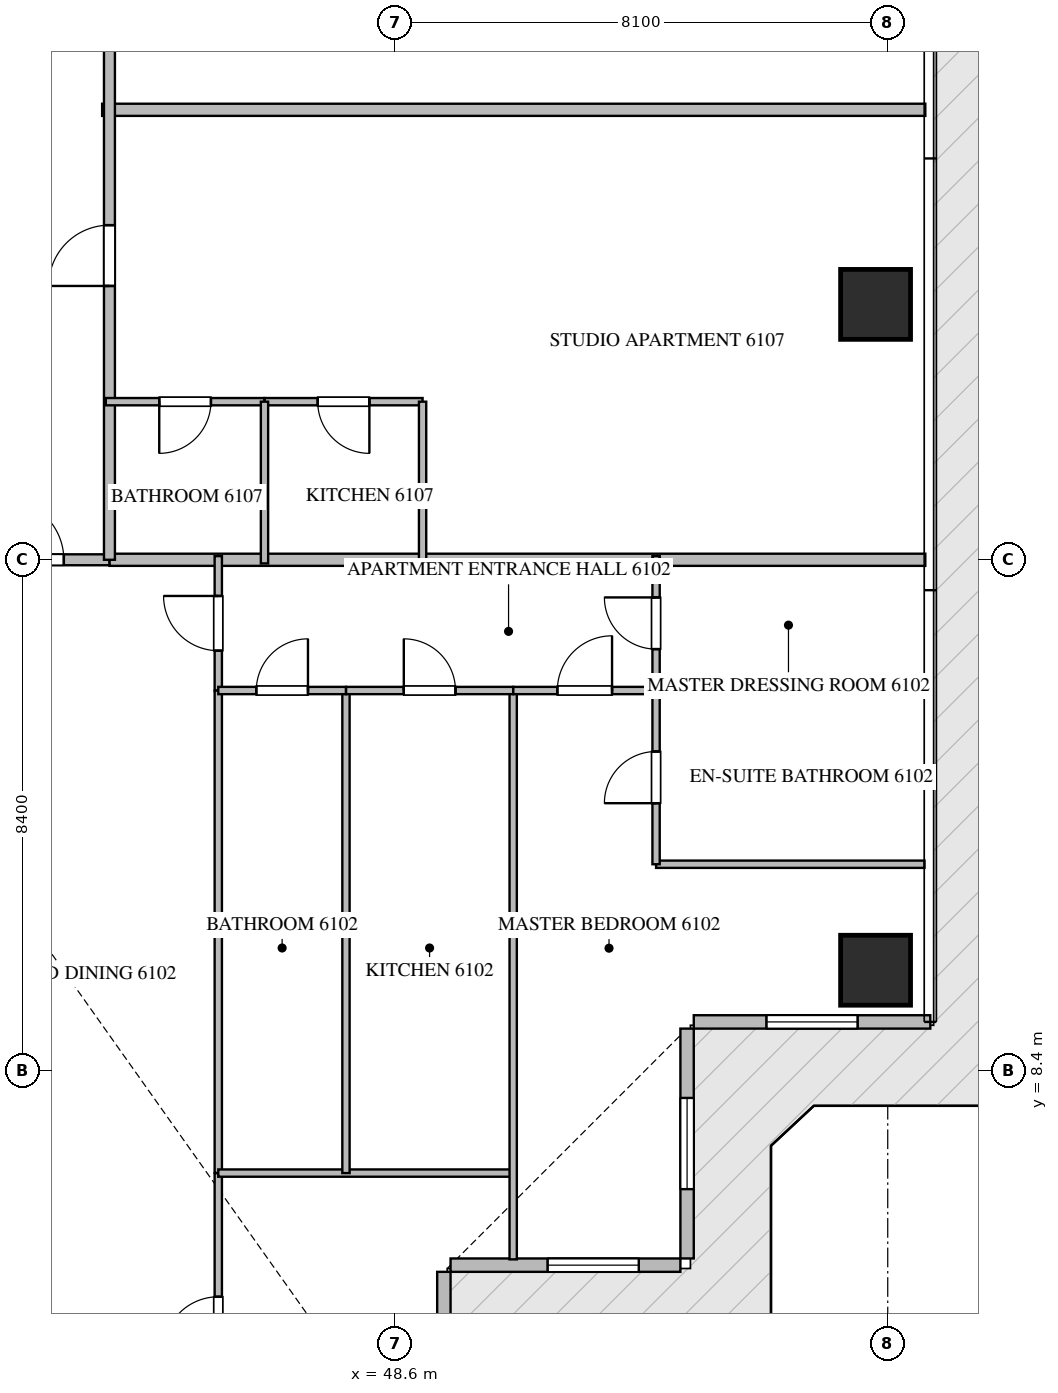
"""IFC4 building model, lengths in metres.
Left out: names, types, materials, properties, quantities, classifications, styles, units other than length and angle.
Written with IfcOpenShell. Run it as: python <this file> out.ifc"""

import sys

from ifc_helpers import new_model, si_unit, direction, frame, frame_2d, origin, origin_2d, place, context, subcontext, project, spatial, rectangle, extrude, source, transform, mapped, element, fill, save


model = new_model("IFC4")
c1 = context("Model", 3, precision=1e-05, world=origin(), true_north=direction((0.0, 1.0)))
c2 = subcontext(c1, "Body", "Model", "MODEL_VIEW")
j1 = project(units=[si_unit("LENGTHUNIT", "METRE"), si_unit("PLANEANGLEUNIT", "RADIAN")], contexts=[c1])
p1 = place(None, origin())
s1 = spatial("IfcSite", under=j1, at=p1, CompositionType="ELEMENT")
p2 = place(p1, origin())
s2 = spatial("IfcBuilding", under=s1, at=p2, CompositionType="ELEMENT")
p3 = place(p2, frame((0.0, 0.0, 245.1)))
s3 = spatial("IfcBuildingStorey", under=s2, at=p3, CompositionType="ELEMENT", Elevation=245.1)
m1 = source(origin(), c2, "Body", "SweptSolid", [
    extrude(rectangle(XDim=1.15, YDim=1.15, at=origin_2d()), origin(), (0.0, 0.0, 1.0), 3.85),
])
for number, where, z_axis, x_axis in (
    (1, (56.5, 10.05, -0.26), (0.0, 0.0, 1.0), (1.0, 0.0, 0.0)),
    (2, (56.5, 21.0, -0.26), (0.0, 0.0, 1.0), (1.0, 0.0, 0.0)),
):
    element("IfcColumn", number, at=place(p3, frame(where, z_axis=z_axis, x_axis=x_axis)), inside=s3, PredefinedType="COLUMN", context=c2, shape_type="MappedRepresentation", body=[
        mapped(m1, transform((0.0, 0.0, 0.0), scale=1.0)),
    ])
p4 = place(p3, frame((49.4, 1.2, 0.0), z_axis=(0.0, 0.0, 1.0), x_axis=(0.0, 1.0, 0.0)))
e3 = element("IfcWall", 3, at=p4, inside=s3, PredefinedType="ELEMENTEDWALL", context=c2, shape_type="SweptSolid", body=[
    extrude(rectangle(XDim=3.89, YDim=0.22, at=frame_2d((1.945, 0.0))), origin(), (0.0, 0.0, 1.0), 3.575),
])
p5 = place(p4, frame((1.195, 0.0, 0.65)))
e4 = element("IfcOpeningElement", 4, at=p5, cuts=e3, PredefinedType="OPENING", context=c2, shape_type="SweptSolid", body=[
    extrude(rectangle(XDim=1.5, YDim=2.25, at=frame_2d((0.75, 1.125))), frame((0.0, 0.12, 0.0), z_axis=(0.0, -1.0, 0.0), x_axis=(1.0, 0.0, 0.0)), (0.0, 0.0, 1.0), 0.24),
])
p6 = place(p3, frame((49.51, 5.2, 0.0), z_axis=(0.0, 0.0, 1.0), x_axis=(1.0, 0.0, 0.0)))
e5 = element("IfcWall", 5, at=p6, inside=s3, PredefinedType="ELEMENTEDWALL", context=c2, shape_type="SweptSolid", body=[
    extrude(rectangle(XDim=3.78, YDim=0.22, at=frame_2d((1.89, 0.0))), origin(), (0.0, 0.0, 1.0), 3.575),
])
p7 = place(p6, frame((1.596, 0.0, 0.65)))
e6 = element("IfcOpeningElement", 6, at=p7, cuts=e5, PredefinedType="OPENING", context=c2, shape_type="SweptSolid", body=[
    extrude(rectangle(XDim=1.5, YDim=2.25, at=frame_2d((0.75, 1.125))), frame((0.0, 0.12, 0.0), z_axis=(0.0, -1.0, 0.0), x_axis=(1.0, 0.0, 0.0)), (0.0, 0.0, 1.0), 0.24),
])
p8 = place(p3, frame((53.4, 5.31, 0.0), z_axis=(0.0, 0.0, 1.0), x_axis=(0.0, 1.0, 0.0)))
e7 = element("IfcWall", 7, at=p8, inside=s3, PredefinedType="ELEMENTEDWALL", context=c2, shape_type="SweptSolid", body=[
    extrude(rectangle(XDim=3.78, YDim=0.22, at=frame_2d((1.89, 0.0))), origin(), (0.0, 0.0, 1.0), 3.575),
])
p9 = place(p8, frame((1.14, 0.0, 0.65)))
e8 = element("IfcOpeningElement", 8, at=p9, cuts=e7, PredefinedType="OPENING", context=c2, shape_type="SweptSolid", body=[
    extrude(rectangle(XDim=1.5, YDim=2.25, at=frame_2d((0.75, 1.125))), frame((0.0, 0.12, 0.0), z_axis=(0.0, -1.0, 0.0), x_axis=(1.0, 0.0, 0.0)), (0.0, 0.0, 1.0), 0.24),
])
p10 = place(p3, frame((53.51, 9.2, 0.0), z_axis=(0.0, 0.0, 1.0), x_axis=(1.0, 0.0, 0.0)))
e9 = element("IfcWall", 9, at=p10, inside=s3, PredefinedType="ELEMENTEDWALL", context=c2, shape_type="SweptSolid", body=[
    extrude(rectangle(XDim=3.89, YDim=0.22, at=frame_2d((1.945, 0.0))), origin(), (0.0, 0.0, 1.0), 3.575),
])
p11 = place(p10, frame((1.195, 0.0, 0.65)))
e10 = element("IfcOpeningElement", 10, at=p11, cuts=e9, PredefinedType="OPENING", context=c2, shape_type="SweptSolid", body=[
    extrude(rectangle(XDim=1.5, YDim=2.25, at=frame_2d((0.75, 1.125))), frame((0.0, 0.12, 0.0), z_axis=(0.0, -1.0, 0.0), x_axis=(1.0, 0.0, 0.0)), (0.0, 0.0, 1.0), 0.24),
])
p12 = place(p3, frame((43.78, 24.2, 0.0), z_axis=(0.0, 0.0, 1.0), x_axis=(1.0, 0.0, 0.0)))
e11 = element("IfcWall", 11, at=p12, inside=s3, PredefinedType="PARTITIONING", context=c2, shape_type="SweptSolid", body=[
    extrude(rectangle(XDim=13.538, YDim=0.2, at=frame_2d((6.769, 0.0))), origin(), (0.0, 0.0, 1.0), 3.59),
])
p13 = place(p3, frame((43.9, 16.8, 0.0), z_axis=(0.0, 0.0, 1.0), x_axis=(1.0, 0.0, 0.0)))
e12 = element("IfcWall", 12, at=p13, inside=s3, PredefinedType="PARTITIONING", context=c2, shape_type="SweptSolid", body=[
    extrude(rectangle(XDim=13.418, YDim=0.2, at=frame_2d((6.709, 0.0))), origin(), (0.0, 0.0, 1.0), 3.59),
])
p14 = place(p3, frame((41.402, 16.8, 0.0), z_axis=(0.0, 0.0, 1.0), x_axis=(1.0, 0.0, 0.0)))
e13 = element("IfcWall", 13, at=p14, inside=s3, PredefinedType="PARTITIONING", context=c2, shape_type="SweptSolid", body=[
    extrude(rectangle(XDim=2.496, YDim=0.18, at=frame_2d((1.248, 0.0))), origin(), (0.0, 0.0, 1.0), 3.59),
])
p15 = place(p14, frame((0.748, 0.0, 0.0)))
e14 = element("IfcOpeningElement", 14, at=p15, cuts=e13, PredefinedType="OPENING", context=c2, shape_type="SweptSolid", body=[
    extrude(rectangle(XDim=1.0, YDim=2.15, at=frame_2d((0.5, 1.075))), frame((0.0, 0.1, 0.0), z_axis=(0.0, -1.0, 0.0), x_axis=(1.0, 0.0, 0.0)), (0.0, 0.0, 1.0), 0.2),
])
p16 = place(p3, frame((43.9, 16.8, 0.0), z_axis=(0.0, 0.0, 1.0), x_axis=(0.0, 1.0, 0.0)))
e15 = element("IfcWall", 15, at=p16, inside=s3, PredefinedType="PARTITIONING", context=c2, shape_type="SweptSolid", body=[
    extrude(rectangle(XDim=16.8, YDim=0.18, at=frame_2d((8.4, 0.0))), origin(), (0.0, 0.0, 1.0), 3.59),
])
p17 = place(p16, frame((4.503, 0.0, 0.0)))
e16 = element("IfcOpeningElement", 16, at=p17, cuts=e15, PredefinedType="OPENING", context=c2, shape_type="SweptSolid", body=[
    extrude(rectangle(XDim=1.0, YDim=2.15, at=frame_2d((0.5, 1.075))), frame((0.0, 0.1, 0.0), z_axis=(0.0, -1.0, 0.0), x_axis=(1.0, 0.0, 0.0)), (0.0, 0.0, 1.0), 0.2),
])
p18 = place(p16, frame((8.706, 0.0, 0.0)))
e17 = element("IfcOpeningElement", 17, at=p18, cuts=e15, PredefinedType="OPENING", context=c2, shape_type="SweptSolid", body=[
    extrude(rectangle(XDim=1.0, YDim=2.15, at=frame_2d((0.5, 1.075))), frame((0.0, 0.1, 0.0), z_axis=(0.0, -1.0, 0.0), x_axis=(1.0, 0.0, 0.0)), (0.0, 0.0, 1.0), 0.2),
])
p19 = place(p3, frame((45.69, 14.65, 0.0), z_axis=(0.0, 0.0, 1.0), x_axis=(0.0, 1.0, 0.0)))
e18 = element("IfcWall", 18, at=p19, inside=s3, PredefinedType="PARTITIONING", context=c2, shape_type="SweptSolid", body=[
    extrude(rectangle(XDim=2.21, YDim=0.12, at=frame_2d((1.105, 0.0))), origin(), (0.0, 0.0, 1.0), 3.59),
])
p20 = place(p19, frame((0.655, 0.0, 0.0)))
e19 = element("IfcOpeningElement", 19, at=p20, cuts=e18, PredefinedType="OPENING", context=c2, shape_type="SweptSolid", body=[
    extrude(rectangle(XDim=0.9, YDim=2.1, at=frame_2d((0.45, 1.05))), frame((0.0, 0.07, 0.0), z_axis=(0.0, -1.0, 0.0), x_axis=(1.0, 0.0, 0.0)), (0.0, 0.0, 1.0), 0.14),
])
p21 = place(p3, frame((45.69, 1.295, 0.0), z_axis=(0.0, 0.0, 1.0), x_axis=(0.0, 1.0, 0.0)))
e20 = element("IfcWall", 20, at=p21, inside=s3, PredefinedType="PARTITIONING", context=c2, shape_type="SweptSolid", body=[
    extrude(rectangle(XDim=5.419, YDim=0.12, at=frame_2d((2.709, 0.0))), origin(), (0.0, 0.0, 1.0), 3.59),
])
p22 = place(p21, frame((2.485, 0.0, 0.0)))
e21 = element("IfcOpeningElement", 21, at=p22, cuts=e20, PredefinedType="OPENING", context=c2, shape_type="SweptSolid", body=[
    extrude(rectangle(XDim=0.9, YDim=2.1, at=frame_2d((0.45, 1.05))), frame((0.0, 0.07, 0.0), z_axis=(0.0, -1.0, 0.0), x_axis=(1.0, 0.0, 0.0)), (0.0, 0.0, 1.0), 0.14),
])
p23 = place(p3, frame((45.69, 6.716, 0.0), z_axis=(0.0, 0.0, 1.0), x_axis=(0.0, 1.0, 0.0)))
e22 = element("IfcWall", 22, at=p23, inside=s3, PredefinedType="PARTITIONING", context=c2, shape_type="SweptSolid", body=[
    extrude(rectangle(XDim=7.932, YDim=0.12, at=frame_2d((3.966, 0.0))), origin(), (0.0, 0.0, 1.0), 3.59),
])
p24 = place(p3, frame((45.69, 6.714, 0.0), z_axis=(0.0, 0.0, 1.0), x_axis=(1.0, 0.0, 0.0)))
e23 = element("IfcWall", 23, at=p24, inside=s3, PredefinedType="PARTITIONING", context=c2, shape_type="SweptSolid", body=[
    extrude(rectangle(XDim=4.85, YDim=0.12, at=frame_2d((2.425, 0.0))), origin(), (0.0, 0.0, 1.0), 3.59),
])
p25 = place(p3, frame((50.54, 5.295, 0.0), z_axis=(0.0, 0.0, 1.0), x_axis=(0.0, 1.0, 0.0)))
e24 = element("IfcWall", 24, at=p25, inside=s3, PredefinedType="PARTITIONING", context=c2, shape_type="SweptSolid", body=[
    extrude(rectangle(XDim=9.355, YDim=0.12, at=frame_2d((4.677, 0.0))), origin(), (0.0, 0.0, 1.0), 3.59),
])
p26 = place(p3, frame((47.79, 6.714, 0.0), z_axis=(0.0, 0.0, 1.0), x_axis=(0.0, 1.0, 0.0)))
e25 = element("IfcWall", 25, at=p26, inside=s3, PredefinedType="PARTITIONING", context=c2, shape_type="SweptSolid", body=[
    extrude(rectangle(XDim=7.936, YDim=0.12, at=frame_2d((3.968, 0.0))), origin(), (0.0, 0.0, 1.0), 3.59),
])
p27 = place(p3, frame((45.69, 14.65, 0.0), z_axis=(0.0, 0.0, 1.0), x_axis=(1.0, 0.0, 0.0)))
e26 = element("IfcWall", 26, at=p27, inside=s3, PredefinedType="PARTITIONING", context=c2, shape_type="SweptSolid", body=[
    extrude(rectangle(XDim=2.1, YDim=0.12, at=frame_2d((1.05, 0.0))), origin(), (0.0, 0.0, 1.0), 3.59),
])
p28 = place(p27, frame((0.625, 0.0, 0.0)))
e27 = element("IfcOpeningElement", 27, at=p28, cuts=e26, PredefinedType="OPENING", context=c2, shape_type="SweptSolid", body=[
    extrude(rectangle(XDim=0.85, YDim=2.1, at=frame_2d((0.425, 1.05))), frame((0.0, 0.07, 0.0), z_axis=(0.0, -1.0, 0.0), x_axis=(1.0, 0.0, 0.0)), (0.0, 0.0, 1.0), 0.14),
])
p29 = place(p3, frame((47.792, 14.65, 0.0), z_axis=(0.0, 0.0, 1.0), x_axis=(1.0, 0.0, 0.0)))
e28 = element("IfcWall", 28, at=p29, inside=s3, PredefinedType="PARTITIONING", context=c2, shape_type="SweptSolid", body=[
    extrude(rectangle(XDim=2.748, YDim=0.12, at=frame_2d((1.374, 0.0))), origin(), (0.0, 0.0, 1.0), 3.59),
])
p30 = place(p29, frame((0.949, 0.0, 0.0)))
e29 = element("IfcOpeningElement", 29, at=p30, cuts=e28, PredefinedType="OPENING", context=c2, shape_type="SweptSolid", body=[
    extrude(rectangle(XDim=0.85, YDim=2.1, at=frame_2d((0.425, 1.05))), frame((0.0, 0.07, 0.0), z_axis=(0.0, -1.0, 0.0), x_axis=(1.0, 0.0, 0.0)), (0.0, 0.0, 1.0), 0.14),
])
p31 = place(p3, frame((50.542, 14.65, 0.0), z_axis=(0.0, 0.0, 1.0), x_axis=(1.0, 0.0, 0.0)))
e30 = element("IfcWall", 30, at=p31, inside=s3, PredefinedType="PARTITIONING", context=c2, shape_type="SweptSolid", body=[
    extrude(rectangle(XDim=2.348, YDim=0.12, at=frame_2d((1.174, 0.0))), origin(), (0.0, 0.0, 1.0), 3.59),
])
p32 = place(p31, frame((0.724, 0.0, 0.0)))
e31 = element("IfcOpeningElement", 31, at=p32, cuts=e30, PredefinedType="OPENING", context=c2, shape_type="SweptSolid", body=[
    extrude(rectangle(XDim=0.9, YDim=2.1, at=frame_2d((0.45, 1.05))), frame((0.0, 0.07, 0.0), z_axis=(0.0, -1.0, 0.0), x_axis=(1.0, 0.0, 0.0)), (0.0, 0.0, 1.0), 0.14),
])
p33 = place(p3, frame((52.89, 11.793, 0.0), z_axis=(0.0, 0.0, 1.0), x_axis=(1.0, 0.0, 0.0)))
e32 = element("IfcWall", 32, at=p33, inside=s3, PredefinedType="PARTITIONING", context=c2, shape_type="SweptSolid", body=[
    extrude(rectangle(XDim=4.415, YDim=0.12, at=frame_2d((2.208, 0.0))), origin(), (0.0, 0.0, 1.0), 3.59),
])
p34 = place(p3, frame((52.892, 14.65, 0.0), z_axis=(0.0, 0.0, 1.0), x_axis=(1.0, 0.0, 0.0)))
e33 = element("IfcWall", 33, at=p34, inside=s3, PredefinedType="PARTITIONING", context=c2, shape_type="SweptSolid", body=[
    extrude(rectangle(XDim=4.413, YDim=0.12, at=frame_2d((2.207, 0.0))), origin(), (0.0, 0.0, 1.0), 3.59),
])
p35 = place(p3, frame((52.89, 11.793, 0.0), z_axis=(0.0, 0.0, 1.0), x_axis=(0.0, 1.0, 0.0)))
e34 = element("IfcWall", 34, at=p35, inside=s3, PredefinedType="PARTITIONING", context=c2, shape_type="SweptSolid", body=[
    extrude(rectangle(XDim=2.857, YDim=0.12, at=frame_2d((1.428, 0.0))), origin(), (0.0, 0.0, 1.0), 3.59),
])
p36 = place(p35, frame((1.004, 0.0, 0.0)))
e35 = element("IfcOpeningElement", 35, at=p36, cuts=e34, PredefinedType="OPENING", context=c2, shape_type="SweptSolid", body=[
    extrude(rectangle(XDim=0.85, YDim=2.1, at=frame_2d((0.425, 1.05))), frame((0.0, 0.07, 0.0), z_axis=(0.0, -1.0, 0.0), x_axis=(1.0, 0.0, 0.0)), (0.0, 0.0, 1.0), 0.14),
])
p37 = place(p3, frame((52.89, 14.652, 0.0), z_axis=(0.0, 0.0, 1.0), x_axis=(0.0, 1.0, 0.0)))
e36 = element("IfcWall", 36, at=p37, inside=s3, PredefinedType="PARTITIONING", context=c2, shape_type="SweptSolid", body=[
    extrude(rectangle(XDim=2.208, YDim=0.12, at=frame_2d((1.104, 0.0))), origin(), (0.0, 0.0, 1.0), 3.59),
])
p38 = place(p37, frame((0.679, 0.0, 0.0)))
e37 = element("IfcOpeningElement", 37, at=p38, cuts=e36, PredefinedType="OPENING", context=c2, shape_type="SweptSolid", body=[
    extrude(rectangle(XDim=0.85, YDim=2.1, at=frame_2d((0.425, 1.05))), frame((0.0, 0.07, 0.0), z_axis=(0.0, -1.0, 0.0), x_axis=(1.0, 0.0, 0.0)), (0.0, 0.0, 1.0), 0.14),
])
p39 = place(p3, frame((49.05, 19.4, 0.0), z_axis=(0.0, 0.0, 1.0), x_axis=(-1.0, 0.0, 0.0)))
e38 = element("IfcWall", 38, at=p39, inside=s3, PredefinedType="PARTITIONING", context=c2, shape_type="SweptSolid", body=[
    extrude(rectangle(XDim=2.6, YDim=0.12, at=frame_2d((1.3, 0.0))), origin(), (0.0, 0.0, 1.0), 3.59),
])
p40 = place(p39, frame((0.875, 0.0, 0.0)))
e39 = element("IfcOpeningElement", 39, at=p40, cuts=e38, PredefinedType="OPENING", context=c2, shape_type="SweptSolid", body=[
    extrude(rectangle(XDim=0.85, YDim=2.1, at=frame_2d((0.425, 1.05))), frame((0.0, 0.07, 0.0), z_axis=(0.0, -1.0, 0.0), x_axis=(1.0, 0.0, 0.0)), (0.0, 0.0, 1.0), 0.14),
])
p41 = place(p3, frame((46.448, 19.4, 0.0), z_axis=(0.0, 0.0, 1.0), x_axis=(-1.0, 0.0, 0.0)))
e40 = element("IfcWall", 40, at=p41, inside=s3, PredefinedType="PARTITIONING", context=c2, shape_type="SweptSolid", body=[
    extrude(rectangle(XDim=2.608, YDim=0.12, at=frame_2d((1.304, 0.0))), origin(), (0.0, 0.0, 1.0), 3.59),
])
p42 = place(p41, frame((0.879, 0.0, 0.0)))
e41 = element("IfcOpeningElement", 41, at=p42, cuts=e40, PredefinedType="OPENING", context=c2, shape_type="SweptSolid", body=[
    extrude(rectangle(XDim=0.85, YDim=2.1, at=frame_2d((0.425, 1.05))), frame((0.0, 0.07, 0.0), z_axis=(0.0, -1.0, 0.0), x_axis=(1.0, 0.0, 0.0)), (0.0, 0.0, 1.0), 0.14),
])
for number, where, z_axis, x_axis in (
    (42, (46.45, 16.74, 0.0), (0.0, 0.0, 1.0), (0.0, 1.0, 0.0)),
    (43, (49.05, 16.74, 0.0), (0.0, 0.0, 1.0), (0.0, 1.0, 0.0)),
):
    element("IfcWall", number, at=place(p3, frame(where, z_axis=z_axis, x_axis=x_axis)), inside=s3, PredefinedType="PARTITIONING", context=c2, shape_type="SweptSolid", body=[
        extrude(rectangle(XDim=2.66, YDim=0.12, at=frame_2d((1.33, 0.0))), origin(), (0.0, 0.0, 1.0), 3.59),
    ])
m2 = source(origin(), c2, "Body", "SweptSolid", [
    extrude(rectangle(XDim=1.5, YDim=2.25, at=frame_2d((0.75, 1.125))), frame((0.0, 0.03, 0.0), z_axis=(0.0, -1.0, 0.0), x_axis=(1.0, 0.0, 0.0)), (0.0, 0.0, 1.0), 0.06),
])
p43 = place(p7, origin())
e44 = element("IfcWindow", 44, at=p43, inside=s3, PartitioningType="SINGLE_PANEL", PredefinedType="WINDOW", context=c2, shape_type="MappedRepresentation", body=[
    mapped(m2, transform((0.0, 0.0, 0.0), scale=1.0)),
])
fill(e6, e44)
p44 = place(p9, origin())
e45 = element("IfcWindow", 45, at=p44, inside=s3, PartitioningType="SINGLE_PANEL", PredefinedType="WINDOW", context=c2, shape_type="MappedRepresentation", body=[
    mapped(m2, transform((0.0, 0.0, 0.0), scale=1.0)),
])
fill(e8, e45)
p45 = place(p11, origin())
e46 = element("IfcWindow", 46, at=p45, inside=s3, PartitioningType="SINGLE_PANEL", PredefinedType="WINDOW", context=c2, shape_type="MappedRepresentation", body=[
    mapped(m2, transform((0.0, 0.0, 0.0), scale=1.0)),
])
fill(e10, e46)
m3 = source(origin(), c2, "Body", "SweptSolid", [
    extrude(rectangle(XDim=1.0, YDim=2.15, at=frame_2d((0.5, 1.075))), frame((0.0, 0.025, 0.0), z_axis=(0.0, -1.0, 0.0), x_axis=(1.0, 0.0, 0.0)), (0.0, 0.0, 1.0), 0.05),
])
p46 = place(p15, origin())
e47 = element("IfcDoor", 47, at=p46, inside=s3, OperationType="SINGLE_SWING_LEFT", PredefinedType="DOOR", context=c2, shape_type="MappedRepresentation", body=[
    mapped(m3, transform((0.0, 0.0, 0.0), scale=1.0)),
])
fill(e14, e47)
p47 = place(p17, origin())
e48 = element("IfcDoor", 48, at=p47, inside=s3, OperationType="SINGLE_SWING_LEFT", PredefinedType="DOOR", context=c2, shape_type="MappedRepresentation", body=[
    mapped(m3, transform((0.0, 0.0, 0.0), scale=1.0)),
])
fill(e16, e48)
m4 = source(origin(), c2, "Body", "SweptSolid", [
    extrude(rectangle(XDim=0.9, YDim=2.1, at=frame_2d((0.45, 1.05))), frame((0.0, 0.025, 0.0), z_axis=(0.0, -1.0, 0.0), x_axis=(1.0, 0.0, 0.0)), (0.0, 0.0, 1.0), 0.05),
])
p48 = place(p20, origin())
e49 = element("IfcDoor", 49, at=p48, inside=s3, OperationType="SINGLE_SWING_RIGHT", PredefinedType="DOOR", context=c2, shape_type="MappedRepresentation", body=[
    mapped(m4, transform((0.0, 0.0, 0.0), scale=1.0)),
])
fill(e19, e49)
p49 = place(p22, origin())
e50 = element("IfcDoor", 50, at=p49, inside=s3, OperationType="SINGLE_SWING_LEFT", PredefinedType="DOOR", context=c2, shape_type="MappedRepresentation", body=[
    mapped(m4, transform((0.0, 0.0, 0.0), scale=1.0)),
])
fill(e21, e50)
m5 = source(origin(), c2, "Body", "SweptSolid", [
    extrude(rectangle(XDim=0.85, YDim=2.1, at=frame_2d((0.425, 1.05))), frame((0.0, 0.025, 0.0), z_axis=(0.0, -1.0, 0.0), x_axis=(1.0, 0.0, 0.0)), (0.0, 0.0, 1.0), 0.05),
])
p50 = place(p28, origin())
e51 = element("IfcDoor", 51, at=p50, inside=s3, OperationType="SINGLE_SWING_RIGHT", PredefinedType="DOOR", context=c2, shape_type="MappedRepresentation", body=[
    mapped(m5, transform((0.0, 0.0, 0.0), scale=1.0)),
])
fill(e27, e51)
p51 = place(p30, origin())
e52 = element("IfcDoor", 52, at=p51, inside=s3, OperationType="SINGLE_SWING_LEFT", PredefinedType="DOOR", context=c2, shape_type="MappedRepresentation", body=[
    mapped(m5, transform((0.0, 0.0, 0.0), scale=1.0)),
])
fill(e29, e52)
p52 = place(p32, origin())
e53 = element("IfcDoor", 53, at=p52, inside=s3, OperationType="SINGLE_SWING_RIGHT", PredefinedType="DOOR", context=c2, shape_type="MappedRepresentation", body=[
    mapped(m4, transform((0.0, 0.0, 0.0), scale=1.0)),
])
fill(e31, e53)
p53 = place(p36, origin())
e54 = element("IfcDoor", 54, at=p53, inside=s3, OperationType="SINGLE_SWING_LEFT", PredefinedType="DOOR", context=c2, shape_type="MappedRepresentation", body=[
    mapped(m5, transform((0.0, 0.0, 0.0), scale=1.0)),
])
fill(e35, e54)
p54 = place(p38, origin())
e55 = element("IfcDoor", 55, at=p54, inside=s3, OperationType="SINGLE_SWING_RIGHT", PredefinedType="DOOR", context=c2, shape_type="MappedRepresentation", body=[
    mapped(m5, transform((0.0, 0.0, 0.0), scale=1.0)),
])
fill(e37, e55)
p55 = place(p40, origin())
e56 = element("IfcDoor", 56, at=p55, inside=s3, OperationType="SINGLE_SWING_LEFT", PredefinedType="DOOR", context=c2, shape_type="MappedRepresentation", body=[
    mapped(m5, transform((0.0, 0.0, 0.0), scale=1.0)),
])
fill(e39, e56)
p56 = place(p42, origin())
e57 = element("IfcDoor", 57, at=p56, inside=s3, OperationType="SINGLE_SWING_RIGHT", PredefinedType="DOOR", context=c2, shape_type="MappedRepresentation", body=[
    mapped(m5, transform((0.0, 0.0, 0.0), scale=1.0)),
])
fill(e41, e57)
save(model, sys.argv[1])
